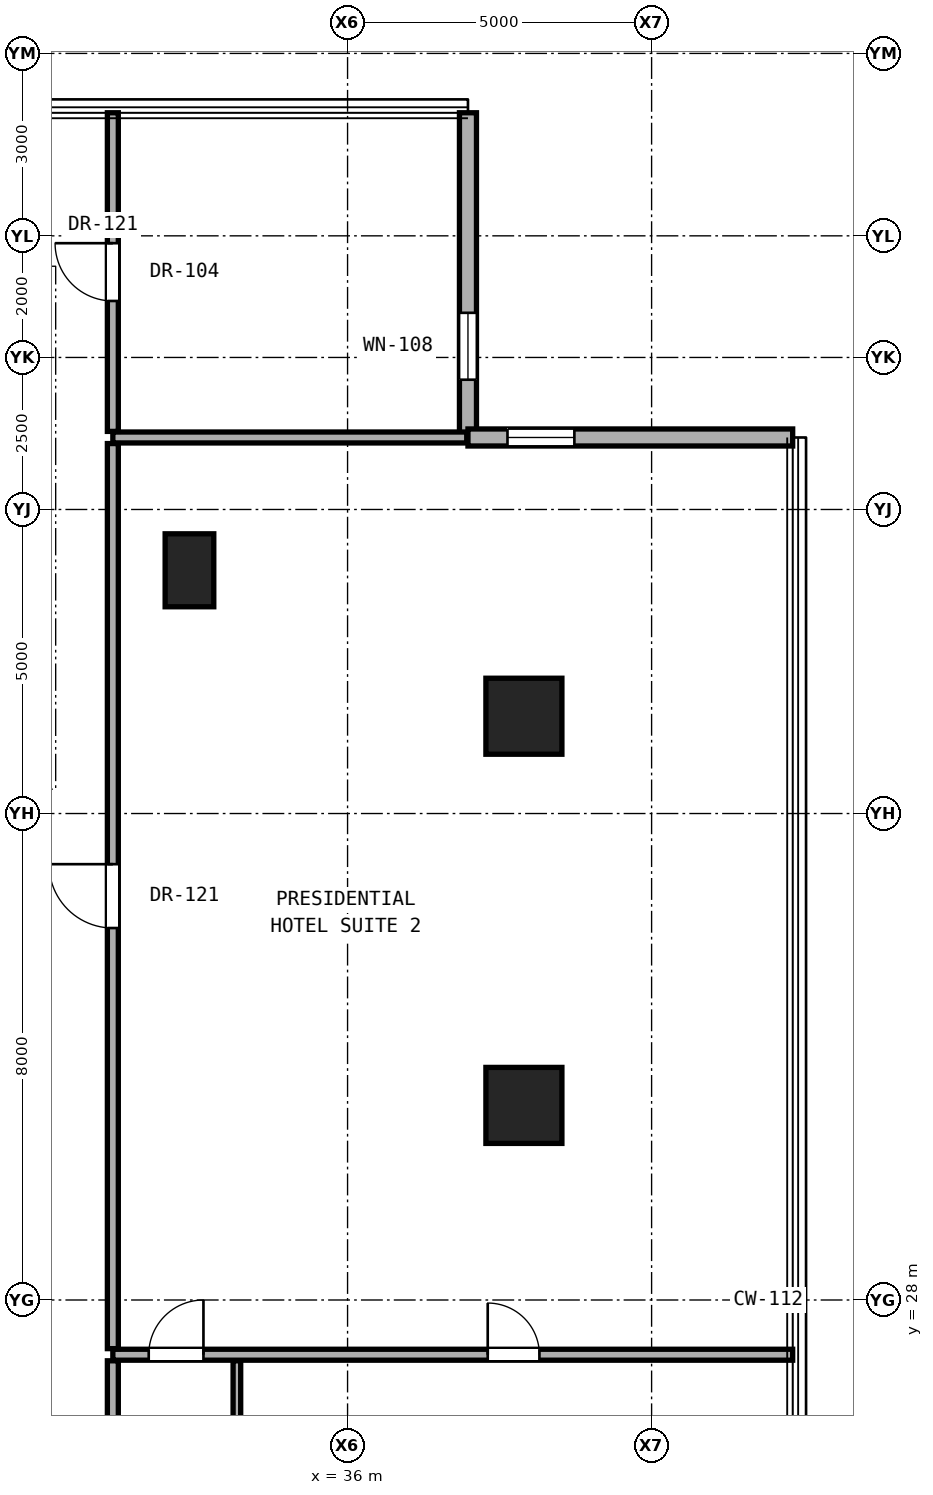
"""IFC4 building model, lengths in metres.
Left out: names, types, materials, properties, quantities, classifications, styles, units other than length and angle.
Written with IfcOpenShell. Run it as: python <this file> out.ifc"""

import sys

from ifc_helpers import new_model, si_unit, direction, frame, frame_2d, origin, origin_2d, place, context, subcontext, project, spatial, rectangle, hollow_rectangle, extrude, element, fill, save


model = new_model("IFC4")
c1 = context("Model", 3, precision=1e-05, world=origin(), true_north=direction((0.0, 1.0)))
c2 = subcontext(c1, "Body", "Model", "MODEL_VIEW")
j1 = project(units=[si_unit("LENGTHUNIT", "METRE"), si_unit("PLANEANGLEUNIT", "RADIAN")], contexts=[c1])
p1 = place(None, origin())
s1 = spatial("IfcSite", under=j1, at=p1, CompositionType="ELEMENT")
p2 = place(p1, origin())
s2 = spatial("IfcBuilding", under=s1, at=p2, CompositionType="ELEMENT")
p3 = place(p2, frame((0.0, 0.0, 78.5)))
s3 = spatial("IfcBuildingStorey", under=s2, at=p3, CompositionType="ELEMENT", Elevation=78.5)
for number, where, z_axis, x_axis in (
    (1, (38.9, 31.2, 0.0), (0.0, 0.0, 1.0), (1.0, 0.0, 0.0)),
    (2, (38.9, 37.6, 0.0), (0.0, 0.0, 1.0), (1.0, 0.0, 0.0)),
):
    element("IfcColumn", number, at=place(p3, frame(where, z_axis=z_axis, x_axis=x_axis)), inside=s3, PredefinedType="COLUMN", context=c2, shape_type="SweptSolid", body=[
        extrude(hollow_rectangle(XDim=1.25, YDim=1.25, WallThickness=0.07, at=origin_2d()), origin(), (0.0, 0.0, 1.0), 3.3),
    ])
p4 = place(p3, frame((33.4, 40.0, 0.0), z_axis=(0.0, 0.0, 1.0), x_axis=(1.0, 0.0, 0.0)))
e3 = element("IfcColumn", 3, at=p4, inside=s3, PredefinedType="PILASTER", context=c2, shape_type="SweptSolid", body=[
    extrude(rectangle(XDim=0.8, YDim=1.2, at=origin_2d()), origin(), (0.0, 0.0, 1.0), 3.3),
])
p5 = place(p3, frame((37.98, 42.184, 0.0), z_axis=(0.0, 0.0, 1.0), x_axis=(0.0, 1.0, 0.0)))
e4 = element("IfcWall", 4, at=p5, inside=s3, PredefinedType="SOLIDWALL", context=c2, shape_type="SweptSolid", body=[
    extrude(rectangle(XDim=5.34, YDim=0.28, at=frame_2d((2.67, 0.0))), origin(), (0.0, 0.0, 1.0), 2.56),
])
p6 = place(p5, frame((0.95, 0.0, 0.41)))
e5 = element("IfcOpeningElement", 5, at=p6, cuts=e4, PredefinedType="OPENING", context=c2, shape_type="SweptSolid", body=[
    extrude(rectangle(XDim=1.1, YDim=2.0, at=frame_2d((0.55, 1.0))), frame((0.0, 0.15, 0.0), z_axis=(0.0, -1.0, 0.0), x_axis=(1.0, 0.0, 0.0)), (0.0, 0.0, 1.0), 0.3),
])
p7 = place(p3, frame((43.32, 42.184, 0.0), z_axis=(0.0, 0.0, 1.0), x_axis=(-1.0, 0.0, 0.0)))
e6 = element("IfcWall", 6, at=p7, inside=s3, PredefinedType="SOLIDWALL", context=c2, shape_type="SweptSolid", body=[
    extrude(rectangle(XDim=5.34, YDim=0.28, at=frame_2d((2.67, 0.0))), origin(), (0.0, 0.0, 1.0), 2.56),
])
p8 = place(p7, frame((3.59, 0.0, 0.41)))
e7 = element("IfcOpeningElement", 7, at=p8, cuts=e6, PredefinedType="OPENING", context=c2, shape_type="SweptSolid", body=[
    extrude(rectangle(XDim=1.1, YDim=2.0, at=frame_2d((0.55, 1.0))), frame((0.0, 0.15, 0.0), z_axis=(0.0, -1.0, 0.0), x_axis=(1.0, 0.0, 0.0)), (0.0, 0.0, 1.0), 0.3),
])
p9 = place(p3, frame((32.14, 27.1, 0.0), z_axis=(0.0, 0.0, 1.0), x_axis=(1.0, 0.0, 0.0)))
e8 = element("IfcWall", 8, at=p9, inside=s3, PredefinedType="PARTITIONING", context=c2, shape_type="SweptSolid", body=[
    extrude(rectangle(XDim=11.18, YDim=0.18, at=frame_2d((5.59, 0.0))), origin(), (0.0, 0.0, 1.0), 2.159),
])
p10 = place(p9, frame((6.165, 0.0, 0.0)))
e9 = element("IfcOpeningElement", 9, at=p10, cuts=e8, PredefinedType="OPENING", context=c2, shape_type="SweptSolid", body=[
    extrude(rectangle(XDim=0.85, YDim=2.01, at=frame_2d((0.425, 1.005))), frame((0.0, 0.1, 0.0), z_axis=(0.0, -1.0, 0.0), x_axis=(1.0, 0.0, 0.0)), (0.0, 0.0, 1.0), 0.2),
])
p11 = place(p9, frame((0.59, 0.0, 0.0)))
e10 = element("IfcOpeningElement", 10, at=p11, cuts=e8, PredefinedType="OPENING", context=c2, shape_type="SweptSolid", body=[
    extrude(rectangle(XDim=0.9, YDim=2.1, at=frame_2d((0.45, 1.05))), frame((0.0, 0.1, 0.0), z_axis=(0.0, -1.0, 0.0), x_axis=(1.0, 0.0, 0.0)), (0.0, 0.0, 1.0), 0.2),
])
p12 = place(p3, frame((32.14, 42.184, 0.0), z_axis=(0.0, 0.0, 1.0), x_axis=(1.0, 0.0, 0.0)))
e11 = element("IfcWall", 11, at=p12, inside=s3, PredefinedType="PARTITIONING", context=c2, shape_type="SweptSolid", body=[
    extrude(rectangle(XDim=5.82, YDim=0.18, at=frame_2d((2.91, 0.0))), origin(), (0.0, 0.0, 1.0), 2.94),
])
p13 = place(p3, frame((32.14, 24.873, 0.0), z_axis=(0.0, 0.0, 1.0), x_axis=(0.0, 1.0, 0.0)))
e12 = element("IfcWall", 12, at=p13, inside=s3, PredefinedType="PARTITIONING", context=c2, shape_type="SweptSolid", body=[
    extrude(rectangle(XDim=2.127, YDim=0.18, at=frame_2d((1.064, 0.0))), origin(), (0.0, 0.0, 1.0), 2.316),
])
p14 = place(p3, frame((32.14, 27.2, 0.0), z_axis=(0.0, 0.0, 1.0), x_axis=(0.0, 1.0, 0.0)))
e13 = element("IfcWall", 13, at=p14, inside=s3, PredefinedType="PARTITIONING", context=c2, shape_type="SweptSolid", body=[
    extrude(rectangle(XDim=14.884, YDim=0.18, at=frame_2d((7.442, 0.0))), origin(), (0.0, 0.0, 1.0), 2.316),
])
p15 = place(p14, frame((6.917, 0.0, 0.0)))
e14 = element("IfcOpeningElement", 14, at=p15, cuts=e13, PredefinedType="OPENING", context=c2, shape_type="SweptSolid", body=[
    extrude(rectangle(XDim=1.05, YDim=2.2, at=frame_2d((0.525, 1.1))), frame((0.0, 0.1, 0.0), z_axis=(0.0, -1.0, 0.0), x_axis=(1.0, 0.0, 0.0)), (0.0, 0.0, 1.0), 0.2),
])
p16 = place(p3, frame((32.14, 42.284, 0.0), z_axis=(0.0, 0.0, 1.0), x_axis=(0.0, 1.0, 0.0)))
e15 = element("IfcWall", 15, at=p16, inside=s3, PredefinedType="PARTITIONING", context=c2, shape_type="SweptSolid", body=[
    extrude(rectangle(XDim=5.24, YDim=0.18, at=frame_2d((2.62, 0.0))), origin(), (0.0, 0.0, 1.0), 2.94),
])
p17 = place(p16, frame((2.145, 0.0, 0.0)))
e16 = element("IfcOpeningElement", 16, at=p17, cuts=e15, PredefinedType="OPENING", context=c2, shape_type="SweptSolid", body=[
    extrude(rectangle(XDim=0.95, YDim=2.15, at=frame_2d((0.475, 1.075))), frame((0.0, 0.1, 0.0), z_axis=(0.0, -1.0, 0.0), x_axis=(1.0, 0.0, 0.0)), (0.0, 0.0, 1.0), 0.2),
])
p18 = place(p3, frame((34.18, 24.873, 0.0), z_axis=(0.0, 0.0, 1.0), x_axis=(0.0, 1.0, 0.0)))
e17 = element("IfcWall", 17, at=p18, inside=s3, PredefinedType="PARTITIONING", context=c2, shape_type="SweptSolid", body=[
    extrude(rectangle(XDim=2.127, YDim=0.125, at=frame_2d((1.064, 0.0))), origin(), (0.0, 0.0, 1.0), 2.316),
])
p19 = place(p6, origin())
e18 = element("IfcWindow", 18, at=p19, inside=s3, PartitioningType="SINGLE_PANEL", PredefinedType="WINDOW", context=c2, shape_type="SweptSolid", body=[
    extrude(rectangle(XDim=1.1, YDim=2.0, at=frame_2d((0.55, 1.0))), frame((0.0, 0.03, 0.0), z_axis=(0.0, -1.0, 0.0), x_axis=(1.0, 0.0, 0.0)), (0.0, 0.0, 1.0), 0.06),
])
fill(e5, e18)
p20 = place(p8, origin())
e19 = element("IfcWindow", 19, at=p20, inside=s3, PartitioningType="SINGLE_PANEL", PredefinedType="WINDOW", context=c2, shape_type="SweptSolid", body=[
    extrude(rectangle(XDim=1.1, YDim=2.0, at=frame_2d((0.55, 1.0))), frame((0.0, 0.03, 0.0), z_axis=(0.0, -1.0, 0.0), x_axis=(1.0, 0.0, 0.0)), (0.0, 0.0, 1.0), 0.06),
])
fill(e7, e19)
p21 = place(p15, origin())
e20 = element("IfcDoor", 20, at=p21, inside=s3, OperationType="SINGLE_SWING_RIGHT", PredefinedType="DOOR", context=c2, shape_type="SweptSolid", body=[
    extrude(rectangle(XDim=1.05, YDim=2.2, at=frame_2d((0.525, 1.1))), frame((0.0, 0.025, 0.0), z_axis=(0.0, -1.0, 0.0), x_axis=(1.0, 0.0, 0.0)), (0.0, 0.0, 1.0), 0.05),
])
fill(e14, e20)
p22 = place(p10, origin())
e21 = element("IfcDoor", 21, at=p22, inside=s3, OperationType="SINGLE_SWING_LEFT", PredefinedType="DOOR", context=c2, shape_type="SweptSolid", body=[
    extrude(rectangle(XDim=0.85, YDim=2.01, at=frame_2d((0.425, 1.005))), frame((0.0, 0.025, 0.0), z_axis=(0.0, -1.0, 0.0), x_axis=(1.0, 0.0, 0.0)), (0.0, 0.0, 1.0), 0.05),
])
fill(e9, e21)
p23 = place(p11, origin())
e22 = element("IfcDoor", 22, at=p23, inside=s3, OperationType="SINGLE_SWING_RIGHT", PredefinedType="DOOR", context=c2, shape_type="SweptSolid", body=[
    extrude(rectangle(XDim=0.9, YDim=2.1, at=frame_2d((0.45, 1.05))), frame((0.0, 0.025, 0.0), z_axis=(0.0, -1.0, 0.0), x_axis=(1.0, 0.0, 0.0)), (0.0, 0.0, 1.0), 0.05),
])
fill(e10, e22)
p24 = place(p17, origin())
e23 = element("IfcDoor", 23, at=p24, inside=s3, OperationType="SINGLE_SWING_RIGHT", PredefinedType="DOOR", context=c2, shape_type="SweptSolid", body=[
    extrude(rectangle(XDim=0.95, YDim=2.15, at=frame_2d((0.475, 1.075))), frame((0.0, 0.025, 0.0), z_axis=(0.0, -1.0, 0.0), x_axis=(1.0, 0.0, 0.0)), (0.0, 0.0, 1.0), 0.05),
])
fill(e16, e23)
save(model, sys.argv[1])
